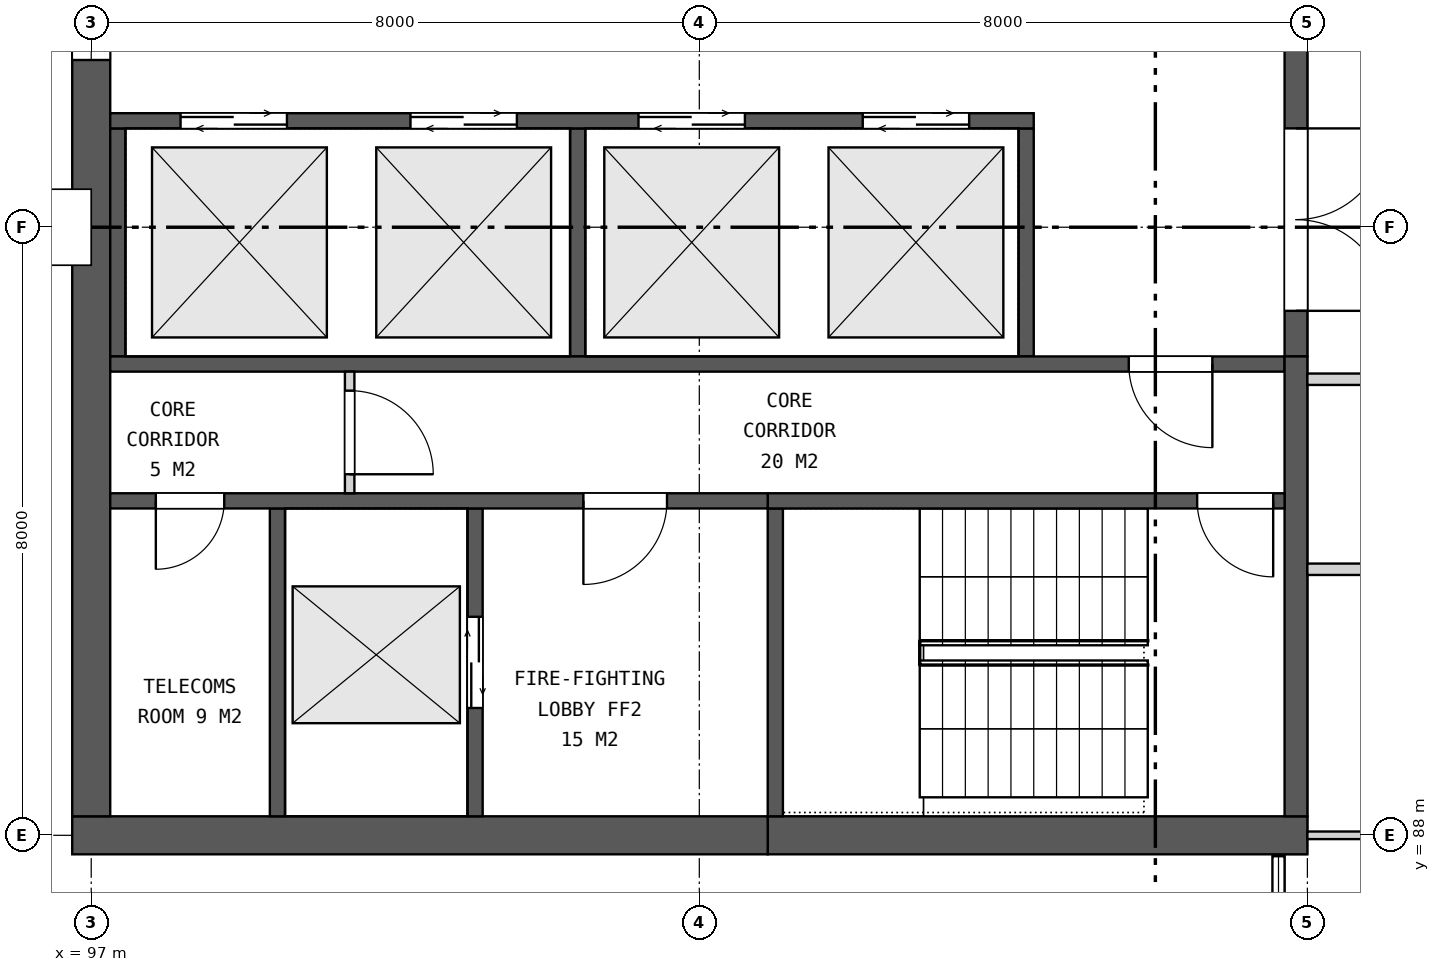
"""IFC4 building model, lengths in metres.
Left out: names, types, materials, properties, quantities, classifications, styles, units other than length and angle.
Written with IfcOpenShell. Run it as: python <this file> out.ifc"""

import sys

from ifc_helpers import new_model, si_unit, direction, frame, frame_2d, origin, place, context, subcontext, project, spatial, rectangle, extrude, element, fill, save


model = new_model("IFC4")
c1 = context("Model", 3, precision=1e-05, world=origin(), true_north=direction((0.0, 1.0)))
c2 = subcontext(c1, "Body", "Model", "MODEL_VIEW")
j1 = project(units=[si_unit("LENGTHUNIT", "METRE"), si_unit("PLANEANGLEUNIT", "RADIAN")], contexts=[c1])
p1 = place(None, origin())
s1 = spatial("IfcSite", under=j1, at=p1, CompositionType="ELEMENT")
p2 = place(p1, origin())
s2 = spatial("IfcBuilding", under=s1, at=p2, CompositionType="ELEMENT")
p3 = place(p2, frame((0.0, 0.0, 295.5)))
s3 = spatial("IfcBuildingStorey", under=s2, at=p3, CompositionType="ELEMENT", Elevation=295.5)
p4 = place(p3, frame((113.0, 88.0, 0.0), z_axis=(0.0, 0.0, 1.0), x_axis=(-1.0, 0.0, 0.0)))
e1 = element("IfcWall", 1, at=p4, inside=s3, PredefinedType="SHEAR", context=c2, shape_type="SweptSolid", body=[
    extrude(rectangle(XDim=7.1, YDim=0.5, at=frame_2d((3.55, 0.0))), origin(), (0.0, 0.0, 1.0), 4.2),
])
p5 = place(p3, frame((105.9, 88.0, 0.0), z_axis=(0.0, 0.0, 1.0), x_axis=(-1.0, 0.0, 0.0)))
e2 = element("IfcWall", 2, at=p5, inside=s3, PredefinedType="SHEAR", context=c2, shape_type="SweptSolid", body=[
    extrude(rectangle(XDim=9.15, YDim=0.5, at=frame_2d((4.575, 0.0))), origin(), (0.0, 0.0, 1.0), 4.2),
])
p6 = place(p3, frame((97.0, 111.75, 0.0), z_axis=(0.0, 0.0, 1.0), x_axis=(0.0, -1.0, 0.0)))
e3 = element("IfcWall", 3, at=p6, inside=s3, PredefinedType="SHEAR", context=c2, shape_type="SweptSolid", body=[
    extrude(rectangle(XDim=23.5, YDim=0.5, at=frame_2d((11.75, 0.0))), origin(), (0.0, 0.0, 1.0), 4.2),
])
p7 = place(p6, frame((9.95, 0.0, 0.15)))
e4 = element("IfcOpeningElement", 4, at=p7, cuts=e3, PredefinedType="OPENING", context=c2, shape_type="SweptSolid", body=[
    extrude(rectangle(XDim=3.6, YDim=3.0, at=frame_2d((1.8, 1.5))), frame((0.0, 0.26, 0.0), z_axis=(0.0, -1.0, 0.0), x_axis=(1.0, 0.0, 0.0)), (0.0, 0.0, 1.0), 0.52),
])
p8 = place(p3, frame((112.85, 105.7, 0.0), z_axis=(0.0, 0.0, 1.0), x_axis=(0.0, -1.0, 0.0)))
e5 = element("IfcWall", 5, at=p8, inside=s3, PredefinedType="SHEAR", context=c2, shape_type="SweptSolid", body=[
    extrude(rectangle(XDim=11.4, YDim=0.3, at=frame_2d((5.7, 0.0))), origin(), (0.0, 0.0, 1.0), 4.2),
])
p9 = place(p8, frame((0.6, 0.0, 0.0)))
e6 = element("IfcOpeningElement", 6, at=p9, cuts=e5, PredefinedType="OPENING", context=c2, shape_type="SweptSolid", body=[
    extrude(rectangle(XDim=2.4, YDim=2.4, at=frame_2d((1.2, 1.2))), frame((0.0, 0.16, 0.0), z_axis=(0.0, -1.0, 0.0), x_axis=(1.0, 0.0, 0.0)), (0.0, 0.0, 1.0), 0.32),
])
p10 = place(p8, frame((4.5, 0.0, 0.0)))
e7 = element("IfcOpeningElement", 7, at=p10, cuts=e5, PredefinedType="OPENING", context=c2, shape_type="SweptSolid", body=[
    extrude(rectangle(XDim=2.4, YDim=2.4, at=frame_2d((1.2, 1.2))), frame((0.0, 0.16, 0.0), z_axis=(0.0, -1.0, 0.0), x_axis=(1.0, 0.0, 0.0)), (0.0, 0.0, 1.0), 0.32),
])
p11 = place(p8, frame((8.4, 0.0, 0.0)))
e8 = element("IfcOpeningElement", 8, at=p11, cuts=e5, PredefinedType="OPENING", context=c2, shape_type="SweptSolid", body=[
    extrude(rectangle(XDim=2.4, YDim=2.4, at=frame_2d((1.2, 1.2))), frame((0.0, 0.16, 0.0), z_axis=(0.0, -1.0, 0.0), x_axis=(1.0, 0.0, 0.0)), (0.0, 0.0, 1.0), 0.32),
])
for number, where, z_axis, x_axis in (
    (9, (109.3, 97.3, 0.0), (0.0, 0.0, 1.0), (0.0, -1.0, 0.0)),
    (10, (103.4, 97.3, 0.0), (0.0, 0.0, 1.0), (0.0, -1.0, 0.0)),
    (11, (97.35, 97.3, 0.0), (0.0, 0.0, 1.0), (0.0, -1.0, 0.0)),
):
    element("IfcWall", number, at=place(p3, frame(where, z_axis=z_axis, x_axis=x_axis)), inside=s3, PredefinedType="SHEAR", context=c2, shape_type="SweptSolid", body=[
        extrude(rectangle(XDim=3.0, YDim=0.2, at=frame_2d((1.5, 0.0))), origin(), (0.0, 0.0, 1.0), 4.2),
    ])
p12 = place(p3, frame((109.4, 97.4, 0.0), z_axis=(0.0, 0.0, 1.0), x_axis=(-1.0, 0.0, 0.0)))
e12 = element("IfcWall", 12, at=p12, inside=s3, PredefinedType="SHEAR", context=c2, shape_type="SweptSolid", body=[
    extrude(rectangle(XDim=12.15, YDim=0.2, at=frame_2d((6.075, 0.0))), origin(), (0.0, 0.0, 1.0), 4.2),
])
p13 = place(p12, frame((0.85, 0.0, 0.0)))
e13 = element("IfcOpeningElement", 13, at=p13, cuts=e12, PredefinedType="OPENING", context=c2, shape_type="SweptSolid", body=[
    extrude(rectangle(XDim=1.4, YDim=2.1, at=frame_2d((0.7, 1.05))), frame((0.0, 0.11, 0.0), z_axis=(0.0, -1.0, 0.0), x_axis=(1.0, 0.0, 0.0)), (0.0, 0.0, 1.0), 0.22),
])
p14 = place(p12, frame((3.8, 0.0, 0.0)))
e14 = element("IfcOpeningElement", 14, at=p14, cuts=e12, PredefinedType="OPENING", context=c2, shape_type="SweptSolid", body=[
    extrude(rectangle(XDim=1.4, YDim=2.1, at=frame_2d((0.7, 1.05))), frame((0.0, 0.11, 0.0), z_axis=(0.0, -1.0, 0.0), x_axis=(1.0, 0.0, 0.0)), (0.0, 0.0, 1.0), 0.22),
])
p15 = place(p12, frame((6.8, 0.0, 0.0)))
e15 = element("IfcOpeningElement", 15, at=p15, cuts=e12, PredefinedType="OPENING", context=c2, shape_type="SweptSolid", body=[
    extrude(rectangle(XDim=1.4, YDim=2.1, at=frame_2d((0.7, 1.05))), frame((0.0, 0.11, 0.0), z_axis=(0.0, -1.0, 0.0), x_axis=(1.0, 0.0, 0.0)), (0.0, 0.0, 1.0), 0.22),
])
p16 = place(p12, frame((9.825, 0.0, 0.0)))
e16 = element("IfcOpeningElement", 16, at=p16, cuts=e12, PredefinedType="OPENING", context=c2, shape_type="SweptSolid", body=[
    extrude(rectangle(XDim=1.4, YDim=2.1, at=frame_2d((0.7, 1.05))), frame((0.0, 0.11, 0.0), z_axis=(0.0, -1.0, 0.0), x_axis=(1.0, 0.0, 0.0)), (0.0, 0.0, 1.0), 0.22),
])
p17 = place(p3, frame((112.7, 94.2, 0.0), z_axis=(0.0, 0.0, 1.0), x_axis=(-1.0, 0.0, 0.0)))
e17 = element("IfcWall", 17, at=p17, inside=s3, PredefinedType="SHEAR", context=c2, shape_type="SweptSolid", body=[
    extrude(rectangle(XDim=15.45, YDim=0.2, at=frame_2d((7.725, 0.0))), origin(), (0.0, 0.0, 1.0), 4.2),
])
p18 = place(p17, frame((0.95, 0.0, 0.0)))
e18 = element("IfcOpeningElement", 18, at=p18, cuts=e17, PredefinedType="OPENING", context=c2, shape_type="SweptSolid", body=[
    extrude(rectangle(XDim=1.1, YDim=2.1, at=frame_2d((0.55, 1.05))), frame((0.0, 0.11, 0.0), z_axis=(0.0, -1.0, 0.0), x_axis=(1.0, 0.0, 0.0)), (0.0, 0.0, 1.0), 0.22),
])
p19 = place(p3, frame((112.85, 94.3, 0.0), z_axis=(0.0, 0.0, 1.0), x_axis=(0.0, -1.0, 0.0)))
e19 = element("IfcWall", 19, at=p19, inside=s3, PredefinedType="SHEAR", context=c2, shape_type="SweptSolid", body=[
    extrude(rectangle(XDim=6.05, YDim=0.3, at=frame_2d((3.025, 0.0))), origin(), (0.0, 0.0, 1.0), 4.2),
])
p20 = place(p3, frame((106.0, 92.3, 0.0), z_axis=(0.0, 0.0, 1.0), x_axis=(0.0, -1.0, 0.0)))
e20 = element("IfcWall", 20, at=p20, inside=s3, PredefinedType="SHEAR", context=c2, shape_type="SweptSolid", body=[
    extrude(rectangle(XDim=4.05, YDim=0.2, at=frame_2d((2.025, 0.0))), origin(), (0.0, 0.0, 1.0), 4.2),
])
p21 = place(p3, frame((102.05, 92.3, 0.0), z_axis=(0.0, 0.0, 1.0), x_axis=(0.0, -1.0, 0.0)))
e21 = element("IfcWall", 21, at=p21, inside=s3, PredefinedType="SHEAR", context=c2, shape_type="SweptSolid", body=[
    extrude(rectangle(XDim=4.05, YDim=0.2, at=frame_2d((2.025, 0.0))), origin(), (0.0, 0.0, 1.0), 4.2),
])
p22 = place(p21, frame((1.425, 0.0, 0.0)))
e22 = element("IfcOpeningElement", 22, at=p22, cuts=e21, PredefinedType="OPENING", context=c2, shape_type="SweptSolid", body=[
    extrude(rectangle(XDim=1.2, YDim=2.1, at=frame_2d((0.6, 1.05))), frame((0.0, 0.11, 0.0), z_axis=(0.0, -1.0, 0.0), x_axis=(1.0, 0.0, 0.0)), (0.0, 0.0, 1.0), 0.22),
])
p23 = place(p3, frame((99.45, 92.3, 0.0), z_axis=(0.0, 0.0, 1.0), x_axis=(0.0, -1.0, 0.0)))
e23 = element("IfcWall", 23, at=p23, inside=s3, PredefinedType="SHEAR", context=c2, shape_type="SweptSolid", body=[
    extrude(rectangle(XDim=4.05, YDim=0.2, at=frame_2d((2.025, 0.0))), origin(), (0.0, 0.0, 1.0), 4.2),
])
p24 = place(p3, frame((112.7, 92.4, 0.0), z_axis=(0.0, 0.0, 1.0), x_axis=(-1.0, 0.0, 0.0)))
e24 = element("IfcWall", 24, at=p24, inside=s3, PredefinedType="SHEAR", context=c2, shape_type="SweptSolid", body=[
    extrude(rectangle(XDim=6.8, YDim=0.2, at=frame_2d((3.4, 0.0))), origin(), (0.0, 0.0, 1.0), 4.2),
])
p25 = place(p24, frame((0.15, 0.0, 0.0)))
e25 = element("IfcOpeningElement", 25, at=p25, cuts=e24, PredefinedType="OPENING", context=c2, shape_type="SweptSolid", body=[
    extrude(rectangle(XDim=1.0, YDim=2.1, at=frame_2d((0.5, 1.05))), frame((0.0, 0.11, 0.0), z_axis=(0.0, -1.0, 0.0), x_axis=(1.0, 0.0, 0.0)), (0.0, 0.0, 1.0), 0.22),
])
p26 = place(p3, frame((105.9, 92.4, 0.0), z_axis=(0.0, 0.0, 1.0), x_axis=(-1.0, 0.0, 0.0)))
e26 = element("IfcWall", 26, at=p26, inside=s3, PredefinedType="SHEAR", context=c2, shape_type="SweptSolid", body=[
    extrude(rectangle(XDim=8.65, YDim=0.2, at=frame_2d((4.325, 0.0))), origin(), (0.0, 0.0, 1.0), 4.2),
])
p27 = place(p26, frame((1.325, 0.0, 0.0)))
e27 = element("IfcOpeningElement", 27, at=p27, cuts=e26, PredefinedType="OPENING", context=c2, shape_type="SweptSolid", body=[
    extrude(rectangle(XDim=1.1, YDim=2.1, at=frame_2d((0.55, 1.05))), frame((0.0, 0.11, 0.0), z_axis=(0.0, -1.0, 0.0), x_axis=(1.0, 0.0, 0.0)), (0.0, 0.0, 1.0), 0.22),
])
p28 = place(p26, frame((7.15, 0.0, 0.0)))
e28 = element("IfcOpeningElement", 28, at=p28, cuts=e26, PredefinedType="OPENING", context=c2, shape_type="SweptSolid", body=[
    extrude(rectangle(XDim=0.9, YDim=2.1, at=frame_2d((0.45, 1.05))), frame((0.0, 0.11, 0.0), z_axis=(0.0, -1.0, 0.0), x_axis=(1.0, 0.0, 0.0)), (0.0, 0.0, 1.0), 0.22),
])
p29 = place(p3, frame((100.4, 94.1, 0.0), z_axis=(0.0, 0.0, 1.0), x_axis=(0.0, -1.0, 0.0)))
e29 = element("IfcWall", 29, at=p29, inside=s3, PredefinedType="PARTITIONING", context=c2, shape_type="SweptSolid", body=[
    extrude(rectangle(XDim=1.6, YDim=0.125, at=frame_2d((0.8, 0.0))), origin(), (0.0, 0.0, 1.0), 4.2),
])
p30 = place(p29, frame((0.25, 0.0, 0.0)))
e30 = element("IfcOpeningElement", 30, at=p30, cuts=e29, PredefinedType="OPENING", context=c2, shape_type="SweptSolid", body=[
    extrude(rectangle(XDim=1.1, YDim=2.1, at=frame_2d((0.55, 1.05))), frame((0.0, 0.073, 0.0), z_axis=(0.0, -1.0, 0.0), x_axis=(1.0, 0.0, 0.0)), (0.0, 0.0, 1.0), 0.145),
])
p31 = place(p3, frame((113.0, 88.0, 0.0), z_axis=(0.0, 0.0, 1.0), x_axis=(1.0, 0.0, 0.0)))
e31 = element("IfcWall", 31, at=p31, inside=s3, PredefinedType="PARTITIONING", context=c2, shape_type="SweptSolid", body=[
    extrude(rectangle(XDim=5.525, YDim=0.1, at=frame_2d((2.762, 0.0))), origin(), (0.0, 0.0, 1.0), 3.443),
])
for number, where, z_axis, x_axis in (
    (32, (113.0, 91.5, 0.0), (0.0, 0.0, 1.0), (1.0, 0.0, 0.0)),
    (33, (113.0, 94.0, 0.0), (0.0, 0.0, 1.0), (1.0, 0.0, 0.0)),
):
    element("IfcWall", number, at=place(p3, frame(where, z_axis=z_axis, x_axis=x_axis)), inside=s3, PredefinedType="PARTITIONING", context=c2, shape_type="SweptSolid", body=[
        extrude(rectangle(XDim=5.525, YDim=0.15, at=frame_2d((2.762, 0.0))), origin(), (0.0, 0.0, 1.0), 3.443),
    ])
p32 = place(p7, origin())
e34 = element("IfcWindow", 34, at=p32, inside=s3, PartitioningType="SINGLE_PANEL", PredefinedType="WINDOW", context=c2, shape_type="SweptSolid", body=[
    extrude(rectangle(XDim=3.6, YDim=3.0, at=frame_2d((1.8, 1.5))), frame((0.0, 0.03, 0.0), z_axis=(0.0, -1.0, 0.0), x_axis=(1.0, 0.0, 0.0)), (0.0, 0.0, 1.0), 0.06),
])
fill(e4, e34)
p33 = place(p11, origin())
e35 = element("IfcDoor", 35, at=p33, inside=s3, OperationType="DOUBLE_DOOR_SINGLE_SWING", PredefinedType="DOOR", context=c2, shape_type="SweptSolid", body=[
    extrude(rectangle(XDim=2.4, YDim=2.4, at=frame_2d((1.2, 1.2))), frame((0.0, 0.025, 0.0), z_axis=(0.0, -1.0, 0.0), x_axis=(1.0, 0.0, 0.0)), (0.0, 0.0, 1.0), 0.05),
])
fill(e8, e35)
p34 = place(p13, origin())
e36 = element("IfcDoor", 36, at=p34, inside=s3, OperationType="DOUBLE_DOOR_SLIDING", PredefinedType="DOOR", context=c2, shape_type="SweptSolid", body=[
    extrude(rectangle(XDim=1.4, YDim=2.1, at=frame_2d((0.7, 1.05))), frame((0.0, 0.025, 0.0), z_axis=(0.0, -1.0, 0.0), x_axis=(1.0, 0.0, 0.0)), (0.0, 0.0, 1.0), 0.05),
])
fill(e13, e36)
p35 = place(p14, origin())
e37 = element("IfcDoor", 37, at=p35, inside=s3, OperationType="DOUBLE_DOOR_SLIDING", PredefinedType="DOOR", context=c2, shape_type="SweptSolid", body=[
    extrude(rectangle(XDim=1.4, YDim=2.1, at=frame_2d((0.7, 1.05))), frame((0.0, 0.025, 0.0), z_axis=(0.0, -1.0, 0.0), x_axis=(1.0, 0.0, 0.0)), (0.0, 0.0, 1.0), 0.05),
])
fill(e14, e37)
p36 = place(p15, origin())
e38 = element("IfcDoor", 38, at=p36, inside=s3, OperationType="DOUBLE_DOOR_SLIDING", PredefinedType="DOOR", context=c2, shape_type="SweptSolid", body=[
    extrude(rectangle(XDim=1.4, YDim=2.1, at=frame_2d((0.7, 1.05))), frame((0.0, 0.025, 0.0), z_axis=(0.0, -1.0, 0.0), x_axis=(1.0, 0.0, 0.0)), (0.0, 0.0, 1.0), 0.05),
])
fill(e15, e38)
p37 = place(p16, origin())
e39 = element("IfcDoor", 39, at=p37, inside=s3, OperationType="DOUBLE_DOOR_SLIDING", PredefinedType="DOOR", context=c2, shape_type="SweptSolid", body=[
    extrude(rectangle(XDim=1.4, YDim=2.1, at=frame_2d((0.7, 1.05))), frame((0.0, 0.025, 0.0), z_axis=(0.0, -1.0, 0.0), x_axis=(1.0, 0.0, 0.0)), (0.0, 0.0, 1.0), 0.05),
])
fill(e16, e39)
p38 = place(p18, origin())
e40 = element("IfcDoor", 40, at=p38, inside=s3, OperationType="SINGLE_SWING_LEFT", PredefinedType="DOOR", context=c2, shape_type="SweptSolid", body=[
    extrude(rectangle(XDim=1.1, YDim=2.1, at=frame_2d((0.55, 1.05))), frame((0.0, 0.025, 0.0), z_axis=(0.0, -1.0, 0.0), x_axis=(1.0, 0.0, 0.0)), (0.0, 0.0, 1.0), 0.05),
])
fill(e18, e40)
p39 = place(p22, origin())
e41 = element("IfcDoor", 41, at=p39, inside=s3, OperationType="DOUBLE_DOOR_SLIDING", PredefinedType="DOOR", context=c2, shape_type="SweptSolid", body=[
    extrude(rectangle(XDim=1.2, YDim=2.1, at=frame_2d((0.6, 1.05))), frame((0.0, 0.025, 0.0), z_axis=(0.0, -1.0, 0.0), x_axis=(1.0, 0.0, 0.0)), (0.0, 0.0, 1.0), 0.05),
])
fill(e22, e41)
p40 = place(p25, origin())
e42 = element("IfcDoor", 42, at=p40, inside=s3, OperationType="SINGLE_SWING_LEFT", PredefinedType="DOOR", context=c2, shape_type="SweptSolid", body=[
    extrude(rectangle(XDim=1.0, YDim=2.1, at=frame_2d((0.5, 1.05))), frame((0.0, 0.025, 0.0), z_axis=(0.0, -1.0, 0.0), x_axis=(1.0, 0.0, 0.0)), (0.0, 0.0, 1.0), 0.05),
])
fill(e25, e42)
p41 = place(p27, origin())
e43 = element("IfcDoor", 43, at=p41, inside=s3, OperationType="SINGLE_SWING_RIGHT", PredefinedType="DOOR", context=c2, shape_type="SweptSolid", body=[
    extrude(rectangle(XDim=1.1, YDim=2.1, at=frame_2d((0.55, 1.05))), frame((0.0, 0.025, 0.0), z_axis=(0.0, -1.0, 0.0), x_axis=(1.0, 0.0, 0.0)), (0.0, 0.0, 1.0), 0.05),
])
fill(e27, e43)
p42 = place(p28, origin())
e44 = element("IfcDoor", 44, at=p42, inside=s3, OperationType="SINGLE_SWING_RIGHT", PredefinedType="DOOR", context=c2, shape_type="SweptSolid", body=[
    extrude(rectangle(XDim=0.9, YDim=2.1, at=frame_2d((0.45, 1.05))), frame((0.0, 0.025, 0.0), z_axis=(0.0, -1.0, 0.0), x_axis=(1.0, 0.0, 0.0)), (0.0, 0.0, 1.0), 0.05),
])
fill(e28, e44)
p43 = place(p30, origin())
e45 = element("IfcDoor", 45, at=p43, inside=s3, OperationType="SINGLE_SWING_RIGHT", PredefinedType="DOOR", context=c2, shape_type="SweptSolid", body=[
    extrude(rectangle(XDim=1.1, YDim=2.1, at=frame_2d((0.55, 1.05))), frame((0.0, 0.025, 0.0), z_axis=(0.0, -1.0, 0.0), x_axis=(1.0, 0.0, 0.0)), (0.0, 0.0, 1.0), 0.05),
])
fill(e30, e45)
save(model, sys.argv[1])
